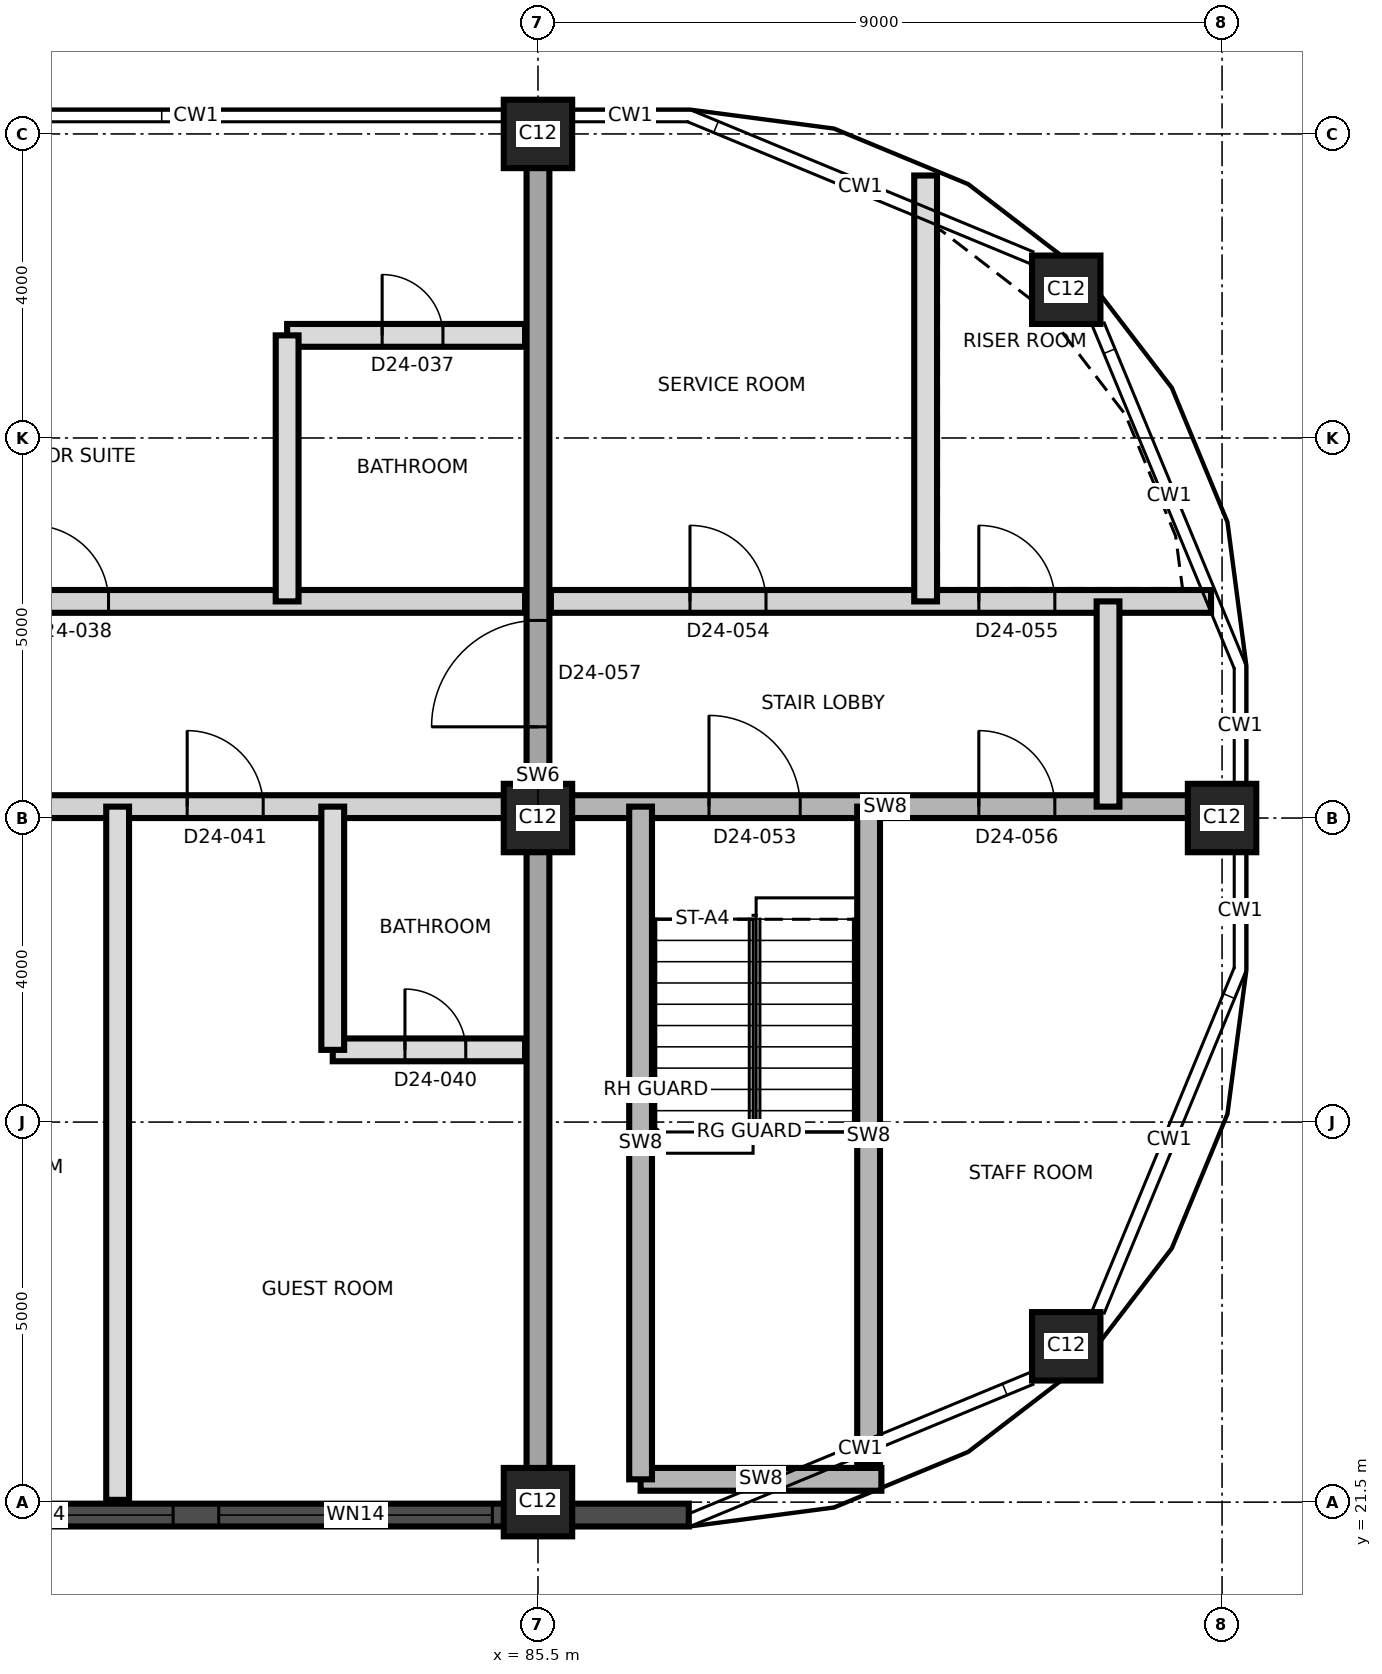
"""IFC4 building model, lengths in metres.
Left out: names, types, materials, properties, quantities, classifications, styles, units other than length and angle.
Written with IfcOpenShell. Run it as: python <this file> out.ifc"""

import sys

from ifc_helpers import new_model, si_unit, direction, frame, frame_2d, origin, origin_2d, place, context, subcontext, project, spatial, rectangle, extrude, element, fill, save


model = new_model("IFC4")
c1 = context("Model", 3, precision=1e-05, world=origin(), true_north=direction((0.0, 1.0)))
c2 = subcontext(c1, "Body", "Model", "MODEL_VIEW")
j1 = project(units=[si_unit("LENGTHUNIT", "METRE"), si_unit("PLANEANGLEUNIT", "RADIAN")], contexts=[c1])
p1 = place(None, origin())
s1 = spatial("IfcSite", under=j1, at=p1, CompositionType="ELEMENT")
p2 = place(p1, origin())
s2 = spatial("IfcBuilding", under=s1, at=p2, CompositionType="ELEMENT")
p3 = place(p2, frame((0.0, 0.0, 221.7)))
s3 = spatial("IfcBuildingStorey", under=s2, at=p3, CompositionType="ELEMENT", Elevation=221.7)
for number, where, z_axis, x_axis in (
    (1, (85.5, 21.5, 0.0), (0.0, 0.0, 1.0), (1.0, 0.0, 0.0)),
    (2, (92.45, 23.55, 0.0), (0.0, 0.0, 1.0), (1.0, 0.0, 0.0)),
    (3, (85.5, 30.5, 0.0), (0.0, 0.0, 1.0), (1.0, 0.0, 0.0)),
    (4, (94.5, 30.5, 0.0), (0.0, 0.0, 1.0), (1.0, 0.0, 0.0)),
    (5, (92.45, 37.45, 0.0), (0.0, 0.0, 1.0), (1.0, 0.0, 0.0)),
    (6, (85.5, 39.5, 0.0), (0.0, 0.0, 1.0), (1.0, 0.0, 0.0)),
):
    element("IfcColumn", number, at=place(p3, frame(where, z_axis=z_axis, x_axis=x_axis)), inside=s3, PredefinedType="COLUMN", context=c2, shape_type="SweptSolid", body=[
        extrude(rectangle(XDim=0.9, YDim=0.9, at=origin_2d()), origin(), (0.0, 0.0, 1.0), 3.7),
    ])
p4 = place(p3, frame((85.5, 21.53, 0.0), z_axis=(0.0, 0.0, 1.0), x_axis=(0.0, 1.0, 0.0)))
e7 = element("IfcWall", 7, at=p4, inside=s3, PredefinedType="SHEAR", context=c2, shape_type="SweptSolid", body=[
    extrude(rectangle(XDim=17.94, YDim=0.3, at=frame_2d((8.97, 0.0))), origin(), (0.0, 0.0, 1.0), 3.7),
])
p5 = place(p4, frame((10.17, 0.0, 0.0)))
e8 = element("IfcOpeningElement", 8, at=p5, cuts=e7, PredefinedType="OPENING", context=c2, shape_type="SweptSolid", body=[
    extrude(rectangle(XDim=1.4, YDim=2.1, at=frame_2d((0.7, 1.05))), frame((0.0, 0.16, 0.0), z_axis=(0.0, -1.0, 0.0), x_axis=(1.0, 0.0, 0.0)), (0.0, 0.0, 1.0), 0.32),
])
p6 = place(p3, frame((59.25, 21.33, 0.0), z_axis=(0.0, 0.0, 1.0), x_axis=(1.0, 0.0, 0.0)))
e9 = element("IfcWall", 9, at=p6, inside=s3, PredefinedType="SOLIDWALL", context=c2, shape_type="SweptSolid", body=[
    extrude(rectangle(XDim=28.234, YDim=0.3, at=frame_2d((14.117, 0.0))), origin(), (0.0, 0.0, 1.0), 3.4),
])
p7 = place(p6, frame((0.975, 0.0, 0.3)))
e10 = element("IfcOpeningElement", 10, at=p7, cuts=e9, PredefinedType="OPENING", context=c2, shape_type="SweptSolid", body=[
    extrude(rectangle(XDim=1.8, YDim=2.4, at=frame_2d((0.9, 1.2))), frame((0.0, 0.16, 0.0), z_axis=(0.0, -1.0, 0.0), x_axis=(1.0, 0.0, 0.0)), (0.0, 0.0, 1.0), 0.32),
])
p8 = place(p6, frame((4.05, 0.0, 0.9)))
e11 = element("IfcOpeningElement", 11, at=p8, cuts=e9, PredefinedType="OPENING", context=c2, shape_type="SweptSolid", body=[
    extrude(rectangle(XDim=3.6, YDim=1.7, at=frame_2d((1.8, 0.85))), frame((0.0, 0.16, 0.0), z_axis=(0.0, -1.0, 0.0), x_axis=(1.0, 0.0, 0.0)), (0.0, 0.0, 1.0), 0.32),
])
p9 = place(p6, frame((8.85, 0.0, 0.9)))
e12 = element("IfcOpeningElement", 12, at=p9, cuts=e9, PredefinedType="OPENING", context=c2, shape_type="SweptSolid", body=[
    extrude(rectangle(XDim=3.6, YDim=1.7, at=frame_2d((1.8, 0.85))), frame((0.0, 0.16, 0.0), z_axis=(0.0, -1.0, 0.0), x_axis=(1.0, 0.0, 0.0)), (0.0, 0.0, 1.0), 0.32),
])
p10 = place(p6, frame((13.05, 0.0, 0.9)))
e13 = element("IfcOpeningElement", 13, at=p10, cuts=e9, PredefinedType="OPENING", context=c2, shape_type="SweptSolid", body=[
    extrude(rectangle(XDim=3.6, YDim=1.7, at=frame_2d((1.8, 0.85))), frame((0.0, 0.16, 0.0), z_axis=(0.0, -1.0, 0.0), x_axis=(1.0, 0.0, 0.0)), (0.0, 0.0, 1.0), 0.32),
])
p11 = place(p6, frame((17.85, 0.0, 0.9)))
e14 = element("IfcOpeningElement", 14, at=p11, cuts=e9, PredefinedType="OPENING", context=c2, shape_type="SweptSolid", body=[
    extrude(rectangle(XDim=3.6, YDim=1.7, at=frame_2d((1.8, 0.85))), frame((0.0, 0.16, 0.0), z_axis=(0.0, -1.0, 0.0), x_axis=(1.0, 0.0, 0.0)), (0.0, 0.0, 1.0), 0.32),
])
p12 = place(p6, frame((22.05, 0.0, 0.9)))
e15 = element("IfcOpeningElement", 15, at=p12, cuts=e9, PredefinedType="OPENING", context=c2, shape_type="SweptSolid", body=[
    extrude(rectangle(XDim=3.6, YDim=1.7, at=frame_2d((1.8, 0.85))), frame((0.0, 0.16, 0.0), z_axis=(0.0, -1.0, 0.0), x_axis=(1.0, 0.0, 0.0)), (0.0, 0.0, 1.0), 0.32),
])
p13 = place(p3, frame((86.85, 21.8, 0.0), z_axis=(0.0, 0.0, 1.0), x_axis=(1.0, 0.0, 0.0)))
e16 = element("IfcWall", 16, at=p13, inside=s3, PredefinedType="SHEAR", context=c2, shape_type="SweptSolid", body=[
    extrude(rectangle(XDim=3.168, YDim=0.3, at=frame_2d((1.584, 0.0))), origin(), (0.0, 0.0, 1.0), 3.4),
])
p14 = place(p3, frame((82.8, 27.45, 0.0), z_axis=(0.0, 0.0, 1.0), x_axis=(1.0, 0.0, 0.0)))
e17 = element("IfcWall", 17, at=p14, inside=s3, PredefinedType="PARTITIONING", context=c2, shape_type="SweptSolid", body=[
    extrude(rectangle(XDim=2.53, YDim=0.3, at=frame_2d((1.265, 0.0))), origin(), (0.0, 0.0, 1.0), 3.4),
])
p15 = place(p14, frame((0.95, 0.0, 0.0)))
e18 = element("IfcOpeningElement", 18, at=p15, cuts=e17, PredefinedType="OPENING", context=c2, shape_type="SweptSolid", body=[
    extrude(rectangle(XDim=0.8, YDim=2.1, at=frame_2d((0.4, 1.05))), frame((0.0, 0.16, 0.0), z_axis=(0.0, -1.0, 0.0), x_axis=(1.0, 0.0, 0.0)), (0.0, 0.0, 1.0), 0.32),
])
p16 = place(p3, frame((58.55, 30.65, 0.0), z_axis=(0.0, 0.0, 1.0), x_axis=(1.0, 0.0, 0.0)))
e19 = element("IfcWall", 19, at=p16, inside=s3, PredefinedType="PARTITIONING", context=c2, shape_type="SweptSolid", body=[
    extrude(rectangle(XDim=26.78, YDim=0.3, at=frame_2d((13.39, 0.0))), origin(), (0.0, 0.0, 1.0), 3.4),
])
p17 = place(p16, frame((2.3, 0.0, 0.0)))
e20 = element("IfcOpeningElement", 20, at=p17, cuts=e19, PredefinedType="OPENING", context=c2, shape_type="SweptSolid", body=[
    extrude(rectangle(XDim=1.0, YDim=2.4, at=frame_2d((0.5, 1.2))), frame((0.0, 0.16, 0.0), z_axis=(0.0, -1.0, 0.0), x_axis=(1.0, 0.0, 0.0)), (0.0, 0.0, 1.0), 0.32),
])
p18 = place(p16, frame((10.1, 0.0, 0.0)))
e21 = element("IfcOpeningElement", 21, at=p18, cuts=e19, PredefinedType="OPENING", context=c2, shape_type="SweptSolid", body=[
    extrude(rectangle(XDim=1.0, YDim=2.1, at=frame_2d((0.5, 1.05))), frame((0.0, 0.16, 0.0), z_axis=(0.0, -1.0, 0.0), x_axis=(1.0, 0.0, 0.0)), (0.0, 0.0, 1.0), 0.32),
])
p19 = place(p16, frame((15.95, 0.0, 0.0)))
e22 = element("IfcOpeningElement", 22, at=p19, cuts=e19, PredefinedType="OPENING", context=c2, shape_type="SweptSolid", body=[
    extrude(rectangle(XDim=1.0, YDim=2.1, at=frame_2d((0.5, 1.05))), frame((0.0, 0.16, 0.0), z_axis=(0.0, -1.0, 0.0), x_axis=(1.0, 0.0, 0.0)), (0.0, 0.0, 1.0), 0.32),
])
p20 = place(p16, frame((19.085, 0.0, 0.0)))
e23 = element("IfcOpeningElement", 23, at=p20, cuts=e19, PredefinedType="OPENING", context=c2, shape_type="SweptSolid", body=[
    extrude(rectangle(XDim=1.2, YDim=2.1, at=frame_2d((0.6, 1.05))), frame((0.0, 0.16, 0.0), z_axis=(0.0, -1.0, 0.0), x_axis=(1.0, 0.0, 0.0)), (0.0, 0.0, 1.0), 0.32),
])
p21 = place(p16, frame((22.335, 0.0, 0.0)))
e24 = element("IfcOpeningElement", 24, at=p21, cuts=e19, PredefinedType="OPENING", context=c2, shape_type="SweptSolid", body=[
    extrude(rectangle(XDim=1.0, YDim=2.1, at=frame_2d((0.5, 1.05))), frame((0.0, 0.16, 0.0), z_axis=(0.0, -1.0, 0.0), x_axis=(1.0, 0.0, 0.0)), (0.0, 0.0, 1.0), 0.32),
])
p22 = place(p3, frame((85.67, 30.65, 0.0), z_axis=(0.0, 0.0, 1.0), x_axis=(1.0, 0.0, 0.0)))
e25 = element("IfcWall", 25, at=p22, inside=s3, PredefinedType="SHEAR", context=c2, shape_type="SweptSolid", body=[
    extrude(rectangle(XDim=8.8, YDim=0.3, at=frame_2d((4.4, 0.0))), origin(), (0.0, 0.0, 1.0), 3.4),
])
p23 = place(p22, frame((2.08, 0.0, 0.0)))
e26 = element("IfcOpeningElement", 26, at=p23, cuts=e25, PredefinedType="OPENING", context=c2, shape_type="SweptSolid", body=[
    extrude(rectangle(XDim=1.2, YDim=2.1, at=frame_2d((0.6, 1.05))), frame((0.0, 0.16, 0.0), z_axis=(0.0, -1.0, 0.0), x_axis=(1.0, 0.0, 0.0)), (0.0, 0.0, 1.0), 0.32),
])
p24 = place(p22, frame((5.63, 0.0, 0.0)))
e27 = element("IfcOpeningElement", 27, at=p24, cuts=e25, PredefinedType="OPENING", context=c2, shape_type="SweptSolid", body=[
    extrude(rectangle(XDim=1.0, YDim=2.1, at=frame_2d((0.5, 1.05))), frame((0.0, 0.16, 0.0), z_axis=(0.0, -1.0, 0.0), x_axis=(1.0, 0.0, 0.0)), (0.0, 0.0, 1.0), 0.32),
])
p25 = place(p3, frame((58.55, 33.35, 0.0), z_axis=(0.0, 0.0, 1.0), x_axis=(1.0, 0.0, 0.0)))
e28 = element("IfcWall", 28, at=p25, inside=s3, PredefinedType="PARTITIONING", context=c2, shape_type="SweptSolid", body=[
    extrude(rectangle(XDim=26.78, YDim=0.3, at=frame_2d((13.39, 0.0))), origin(), (0.0, 0.0, 1.0), 3.4),
])
p26 = place(p25, frame((3.95, 0.0, 0.0)))
e29 = element("IfcOpeningElement", 29, at=p26, cuts=e28, PredefinedType="OPENING", context=c2, shape_type="SweptSolid", body=[
    extrude(rectangle(XDim=1.0, YDim=2.4, at=frame_2d((0.5, 1.2))), frame((0.0, 0.16, 0.0), z_axis=(0.0, -1.0, 0.0), x_axis=(1.0, 0.0, 0.0)), (0.0, 0.0, 1.0), 0.32),
])
p27 = place(p25, frame((12.05, 0.0, 0.0)))
e30 = element("IfcOpeningElement", 30, at=p27, cuts=e28, PredefinedType="OPENING", context=c2, shape_type="SweptSolid", body=[
    extrude(rectangle(XDim=1.0, YDim=2.1, at=frame_2d((0.5, 1.05))), frame((0.0, 0.16, 0.0), z_axis=(0.0, -1.0, 0.0), x_axis=(1.0, 0.0, 0.0)), (0.0, 0.0, 1.0), 0.32),
])
p28 = place(p25, frame((13.85, 0.0, 0.0)))
e31 = element("IfcOpeningElement", 31, at=p28, cuts=e28, PredefinedType="OPENING", context=c2, shape_type="SweptSolid", body=[
    extrude(rectangle(XDim=1.0, YDim=2.1, at=frame_2d((0.5, 1.05))), frame((0.0, 0.16, 0.0), z_axis=(0.0, -1.0, 0.0), x_axis=(1.0, 0.0, 0.0)), (0.0, 0.0, 1.0), 0.32),
])
p29 = place(p25, frame((20.3, 0.0, 0.0)))
e32 = element("IfcOpeningElement", 32, at=p29, cuts=e28, PredefinedType="OPENING", context=c2, shape_type="SweptSolid", body=[
    extrude(rectangle(XDim=1.0, YDim=2.4, at=frame_2d((0.5, 1.2))), frame((0.0, 0.16, 0.0), z_axis=(0.0, -1.0, 0.0), x_axis=(1.0, 0.0, 0.0)), (0.0, 0.0, 1.0), 0.32),
])
p30 = place(p3, frame((85.67, 33.35, 0.0), z_axis=(0.0, 0.0, 1.0), x_axis=(1.0, 0.0, 0.0)))
e33 = element("IfcWall", 33, at=p30, inside=s3, PredefinedType="PARTITIONING", context=c2, shape_type="SweptSolid", body=[
    extrude(rectangle(XDim=8.685, YDim=0.3, at=frame_2d((4.343, 0.0))), origin(), (0.0, 0.0, 1.0), 3.4),
])
p31 = place(p30, frame((1.83, 0.0, 0.0)))
e34 = element("IfcOpeningElement", 34, at=p31, cuts=e33, PredefinedType="OPENING", context=c2, shape_type="SweptSolid", body=[
    extrude(rectangle(XDim=1.0, YDim=2.1, at=frame_2d((0.5, 1.05))), frame((0.0, 0.16, 0.0), z_axis=(0.0, -1.0, 0.0), x_axis=(1.0, 0.0, 0.0)), (0.0, 0.0, 1.0), 0.32),
])
p32 = place(p30, frame((5.63, 0.0, 0.0)))
e35 = element("IfcOpeningElement", 35, at=p32, cuts=e33, PredefinedType="OPENING", context=c2, shape_type="SweptSolid", body=[
    extrude(rectangle(XDim=1.0, YDim=2.1, at=frame_2d((0.5, 1.05))), frame((0.0, 0.16, 0.0), z_axis=(0.0, -1.0, 0.0), x_axis=(1.0, 0.0, 0.0)), (0.0, 0.0, 1.0), 0.32),
])
p33 = place(p3, frame((82.2, 36.85, 0.0), z_axis=(0.0, 0.0, 1.0), x_axis=(1.0, 0.0, 0.0)))
e36 = element("IfcWall", 36, at=p33, inside=s3, PredefinedType="PARTITIONING", context=c2, shape_type="SweptSolid", body=[
    extrude(rectangle(XDim=3.13, YDim=0.3, at=frame_2d((1.565, 0.0))), origin(), (0.0, 0.0, 1.0), 3.4),
])
p34 = place(p33, frame((1.25, 0.0, 0.0)))
e37 = element("IfcOpeningElement", 37, at=p34, cuts=e36, PredefinedType="OPENING", context=c2, shape_type="SweptSolid", body=[
    extrude(rectangle(XDim=0.8, YDim=2.1, at=frame_2d((0.4, 1.05))), frame((0.0, 0.16, 0.0), z_axis=(0.0, -1.0, 0.0), x_axis=(1.0, 0.0, 0.0)), (0.0, 0.0, 1.0), 0.32),
])
p35 = place(p3, frame((79.97, 21.53, 0.0), z_axis=(0.0, 0.0, 1.0), x_axis=(0.0, 1.0, 0.0)))
e38 = element("IfcWall", 38, at=p35, inside=s3, PredefinedType="PARTITIONING", context=c2, shape_type="SweptSolid", body=[
    extrude(rectangle(XDim=9.12, YDim=0.3, at=frame_2d((4.56, 0.0))), origin(), (0.0, 0.0, 1.0), 3.4),
])
p36 = place(p3, frame((82.2, 33.35, 0.0), z_axis=(0.0, 0.0, 1.0), x_axis=(0.0, 1.0, 0.0)))
e39 = element("IfcWall", 39, at=p36, inside=s3, PredefinedType="PARTITIONING", context=c2, shape_type="SweptSolid", body=[
    extrude(rectangle(XDim=3.5, YDim=0.3, at=frame_2d((1.75, 0.0))), origin(), (0.0, 0.0, 1.0), 3.4),
])
p37 = place(p3, frame((82.8, 27.45, 0.0), z_axis=(0.0, 0.0, 1.0), x_axis=(0.0, 1.0, 0.0)))
e40 = element("IfcWall", 40, at=p37, inside=s3, PredefinedType="PARTITIONING", context=c2, shape_type="SweptSolid", body=[
    extrude(rectangle(XDim=3.2, YDim=0.3, at=frame_2d((1.6, 0.0))), origin(), (0.0, 0.0, 1.0), 3.4),
])
p38 = place(p3, frame((86.85, 21.8, 0.0), z_axis=(0.0, 0.0, 1.0), x_axis=(0.0, 1.0, 0.0)))
e41 = element("IfcWall", 41, at=p38, inside=s3, PredefinedType="SHEAR", context=c2, shape_type="SweptSolid", body=[
    extrude(rectangle(XDim=8.85, YDim=0.3, at=frame_2d((4.425, 0.0))), origin(), (0.0, 0.0, 1.0), 3.4),
])
p39 = place(p3, frame((89.85, 21.997, 0.0), z_axis=(0.0, 0.0, 1.0), x_axis=(0.0, 1.0, 0.0)))
e42 = element("IfcWall", 42, at=p39, inside=s3, PredefinedType="SHEAR", context=c2, shape_type="SweptSolid", body=[
    extrude(rectangle(XDim=8.653, YDim=0.3, at=frame_2d((4.326, 0.0))), origin(), (0.0, 0.0, 1.0), 3.4),
])
p40 = place(p3, frame((90.6, 33.35, 0.0), z_axis=(0.0, 0.0, 1.0), x_axis=(0.0, 1.0, 0.0)))
e43 = element("IfcWall", 43, at=p40, inside=s3, PredefinedType="PARTITIONING", context=c2, shape_type="SweptSolid", body=[
    extrude(rectangle(XDim=5.603, YDim=0.3, at=frame_2d((2.801, 0.0))), origin(), (0.0, 0.0, 1.0), 3.4),
])
p41 = place(p3, frame((93.0, 30.65, 0.0), z_axis=(0.0, 0.0, 1.0), x_axis=(0.0, 1.0, 0.0)))
e44 = element("IfcWall", 44, at=p41, inside=s3, PredefinedType="PARTITIONING", context=c2, shape_type="SweptSolid", body=[
    extrude(rectangle(XDim=2.7, YDim=0.3, at=frame_2d((1.35, 0.0))), origin(), (0.0, 0.0, 1.0), 3.4),
])
p42 = place(p11, origin())
e45 = element("IfcWindow", 45, at=p42, inside=s3, PartitioningType="SINGLE_PANEL", PredefinedType="WINDOW", context=c2, shape_type="SweptSolid", body=[
    extrude(rectangle(XDim=3.6, YDim=1.7, at=frame_2d((1.8, 0.85))), frame((0.0, 0.03, 0.0), z_axis=(0.0, -1.0, 0.0), x_axis=(1.0, 0.0, 0.0)), (0.0, 0.0, 1.0), 0.06),
])
fill(e14, e45)
p43 = place(p12, origin())
e46 = element("IfcWindow", 46, at=p43, inside=s3, PartitioningType="SINGLE_PANEL", PredefinedType="WINDOW", context=c2, shape_type="SweptSolid", body=[
    extrude(rectangle(XDim=3.6, YDim=1.7, at=frame_2d((1.8, 0.85))), frame((0.0, 0.03, 0.0), z_axis=(0.0, -1.0, 0.0), x_axis=(1.0, 0.0, 0.0)), (0.0, 0.0, 1.0), 0.06),
])
fill(e15, e46)
p44 = place(p34, origin())
e47 = element("IfcDoor", 47, at=p44, inside=s3, OperationType="SINGLE_SWING_LEFT", PredefinedType="DOOR", context=c2, shape_type="SweptSolid", body=[
    extrude(rectangle(XDim=0.8, YDim=2.1, at=frame_2d((0.4, 1.05))), frame((0.0, 0.025, 0.0), z_axis=(0.0, -1.0, 0.0), x_axis=(1.0, 0.0, 0.0)), (0.0, 0.0, 1.0), 0.05),
])
fill(e37, e47)
p45 = place(p29, origin())
e48 = element("IfcDoor", 48, at=p45, inside=s3, OperationType="SINGLE_SWING_LEFT", PredefinedType="DOOR", context=c2, shape_type="SweptSolid", body=[
    extrude(rectangle(XDim=1.0, YDim=2.4, at=frame_2d((0.5, 1.2))), frame((0.0, 0.025, 0.0), z_axis=(0.0, -1.0, 0.0), x_axis=(1.0, 0.0, 0.0)), (0.0, 0.0, 1.0), 0.05),
])
fill(e32, e48)
p46 = place(p15, origin())
e49 = element("IfcDoor", 49, at=p46, inside=s3, OperationType="SINGLE_SWING_LEFT", PredefinedType="DOOR", context=c2, shape_type="SweptSolid", body=[
    extrude(rectangle(XDim=0.8, YDim=2.1, at=frame_2d((0.4, 1.05))), frame((0.0, 0.025, 0.0), z_axis=(0.0, -1.0, 0.0), x_axis=(1.0, 0.0, 0.0)), (0.0, 0.0, 1.0), 0.05),
])
fill(e18, e49)
p47 = place(p21, origin())
e50 = element("IfcDoor", 50, at=p47, inside=s3, OperationType="SINGLE_SWING_LEFT", PredefinedType="DOOR", context=c2, shape_type="SweptSolid", body=[
    extrude(rectangle(XDim=1.0, YDim=2.1, at=frame_2d((0.5, 1.05))), frame((0.0, 0.025, 0.0), z_axis=(0.0, -1.0, 0.0), x_axis=(1.0, 0.0, 0.0)), (0.0, 0.0, 1.0), 0.05),
])
fill(e24, e50)
p48 = place(p23, origin())
e51 = element("IfcDoor", 51, at=p48, inside=s3, OperationType="SINGLE_SWING_LEFT", PredefinedType="DOOR", context=c2, shape_type="SweptSolid", body=[
    extrude(rectangle(XDim=1.2, YDim=2.1, at=frame_2d((0.6, 1.05))), frame((0.0, 0.025, 0.0), z_axis=(0.0, -1.0, 0.0), x_axis=(1.0, 0.0, 0.0)), (0.0, 0.0, 1.0), 0.05),
])
fill(e26, e51)
p49 = place(p31, origin())
e52 = element("IfcDoor", 52, at=p49, inside=s3, OperationType="SINGLE_SWING_LEFT", PredefinedType="DOOR", context=c2, shape_type="SweptSolid", body=[
    extrude(rectangle(XDim=1.0, YDim=2.1, at=frame_2d((0.5, 1.05))), frame((0.0, 0.025, 0.0), z_axis=(0.0, -1.0, 0.0), x_axis=(1.0, 0.0, 0.0)), (0.0, 0.0, 1.0), 0.05),
])
fill(e34, e52)
p50 = place(p32, origin())
e53 = element("IfcDoor", 53, at=p50, inside=s3, OperationType="SINGLE_SWING_RIGHT", PredefinedType="DOOR", context=c2, shape_type="SweptSolid", body=[
    extrude(rectangle(XDim=1.0, YDim=2.1, at=frame_2d((0.5, 1.05))), frame((0.0, 0.025, 0.0), z_axis=(0.0, -1.0, 0.0), x_axis=(1.0, 0.0, 0.0)), (0.0, 0.0, 1.0), 0.05),
])
fill(e35, e53)
p51 = place(p24, origin())
e54 = element("IfcDoor", 54, at=p51, inside=s3, OperationType="SINGLE_SWING_LEFT", PredefinedType="DOOR", context=c2, shape_type="SweptSolid", body=[
    extrude(rectangle(XDim=1.0, YDim=2.1, at=frame_2d((0.5, 1.05))), frame((0.0, 0.025, 0.0), z_axis=(0.0, -1.0, 0.0), x_axis=(1.0, 0.0, 0.0)), (0.0, 0.0, 1.0), 0.05),
])
fill(e27, e54)
p52 = place(p5, origin())
e55 = element("IfcDoor", 55, at=p52, inside=s3, OperationType="SINGLE_SWING_RIGHT", PredefinedType="DOOR", context=c2, shape_type="SweptSolid", body=[
    extrude(rectangle(XDim=1.4, YDim=2.1, at=frame_2d((0.7, 1.05))), frame((0.0, 0.025, 0.0), z_axis=(0.0, -1.0, 0.0), x_axis=(1.0, 0.0, 0.0)), (0.0, 0.0, 1.0), 0.05),
])
fill(e8, e55)
save(model, sys.argv[1])
